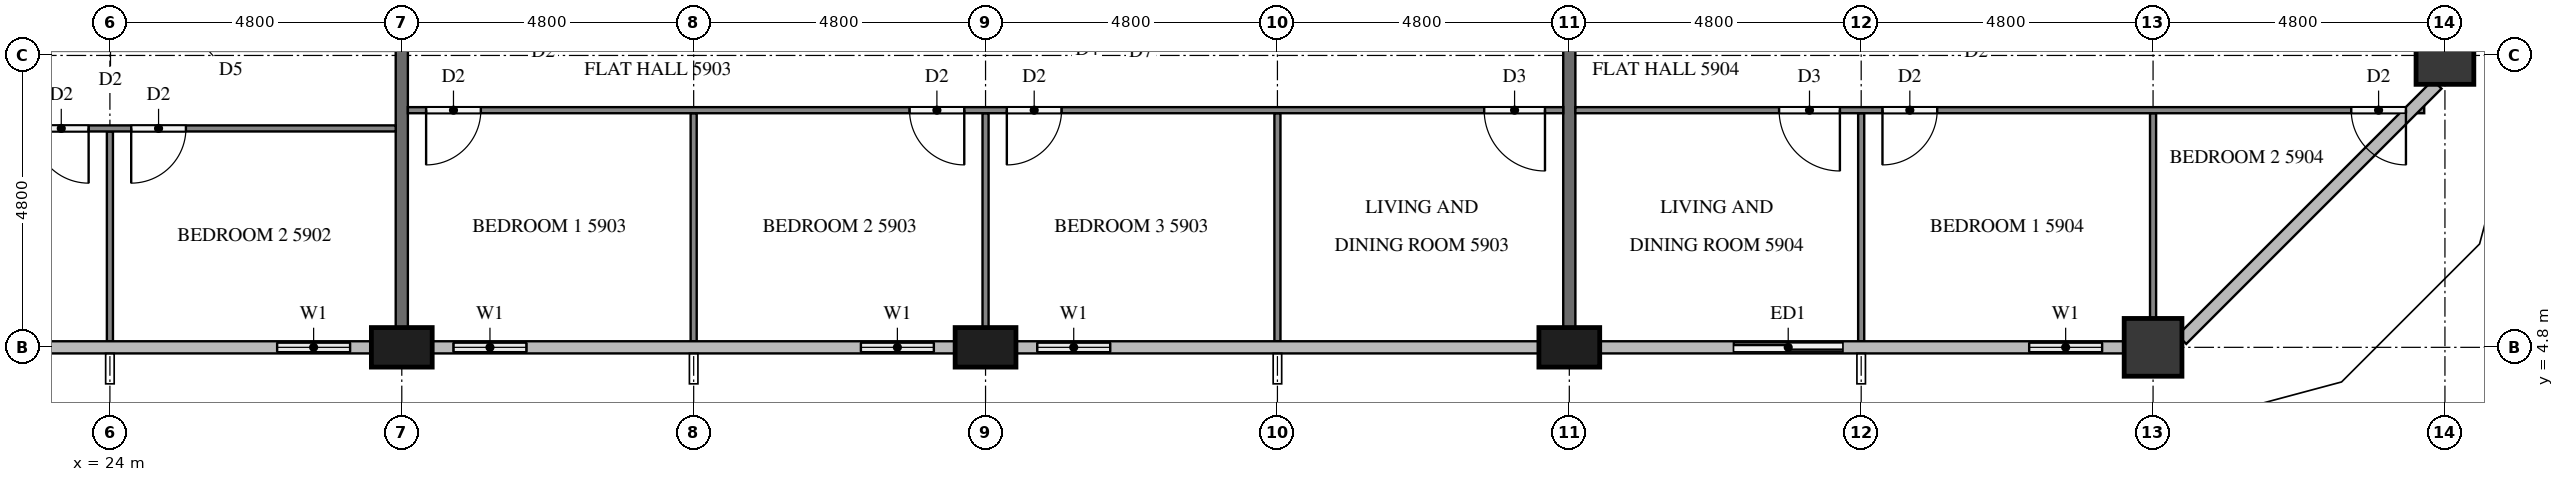
"""IFC4 building model, lengths in metres.
Left out: names, types, materials, properties, quantities, classifications, styles, units other than length and angle.
Written with IfcOpenShell. Run it as: python <this file> out.ifc"""

import sys

from ifc_helpers import new_model, si_unit, direction, frame, frame_2d, origin, origin_2d, place, context, subcontext, project, spatial, rectangle, extrude, element, fill, save


model = new_model("IFC4")
c1 = context("Model", 3, precision=1e-05, world=origin(), true_north=direction((0.0, 1.0)))
c2 = subcontext(c1, "Body", "Model", "MODEL_VIEW")
j1 = project(units=[si_unit("LENGTHUNIT", "METRE"), si_unit("PLANEANGLEUNIT", "RADIAN")], contexts=[c1])
p1 = place(None, origin())
s1 = spatial("IfcSite", under=j1, at=p1, CompositionType="ELEMENT")
p2 = place(p1, origin())
s2 = spatial("IfcBuilding", under=s1, at=p2, CompositionType="ELEMENT")
p3 = place(p2, frame((0.0, 0.0, 226.3)))
s3 = spatial("IfcBuildingStorey", under=s2, at=p3, CompositionType="ELEMENT", Elevation=226.3)
for number, where, z_axis, x_axis in (
    (1, (28.8, 4.8, 0.0), (0.0, 0.0, 1.0), (1.0, 0.0, 0.0)),
    (2, (38.4, 4.8, 0.0), (0.0, 0.0, 1.0), (1.0, 0.0, 0.0)),
    (3, (48.0, 4.8, 0.0), (0.0, 0.0, 1.0), (1.0, 0.0, 0.0)),
):
    element("IfcColumn", number, at=place(p3, frame(where, z_axis=z_axis, x_axis=x_axis)), inside=s3, PredefinedType="COLUMN", context=c2, shape_type="SweptSolid", body=[
        extrude(rectangle(XDim=1.0, YDim=0.65, at=origin_2d()), origin(), (0.0, 0.0, 1.0), 3.2),
    ])
for number, where, z_axis, x_axis in (
    (4, (57.6, 4.8, 0.0), (0.0, 0.0, 1.0), (1.0, 0.0, 0.0)),
    (5, (62.4, 9.6, 0.0), (0.0, 0.0, 1.0), (1.0, 0.0, 0.0)),
):
    element("IfcColumn", number, at=place(p3, frame(where, z_axis=z_axis, x_axis=x_axis)), inside=s3, PredefinedType="COLUMN", context=c2, shape_type="SweptSolid", body=[
        extrude(rectangle(XDim=0.95, YDim=0.95, at=origin_2d()), origin(), (0.0, 0.0, 1.0), 3.2),
    ])
p4 = place(p3, frame((26.4, 4.8, 0.0), z_axis=(0.0, 0.0, 1.0), x_axis=(1.0, 0.0, 0.0)))
e6 = element("IfcWall", 6, at=p4, inside=s3, PredefinedType="SOLIDWALL", context=c2, shape_type="SweptSolid", body=[
    extrude(rectangle(XDim=1.9, YDim=0.15, at=frame_2d((0.95, 0.0))), origin(), (0.0, 0.0, 1.0), 3.2),
])
p5 = place(p4, frame((0.35, 0.0, 0.9)))
e7 = element("IfcOpeningElement", 7, at=p5, cuts=e6, PredefinedType="OPENING", context=c2, shape_type="SweptSolid", body=[
    extrude(rectangle(XDim=1.2, YDim=1.4, at=frame_2d((0.6, 0.7))), frame((0.0, 0.085, 0.0), z_axis=(0.0, -1.0, 0.0), x_axis=(1.0, 0.0, 0.0)), (0.0, 0.0, 1.0), 0.17),
])
p6 = place(p3, frame((29.3, 4.8, 0.0), z_axis=(0.0, 0.0, 1.0), x_axis=(1.0, 0.0, 0.0)))
e8 = element("IfcWall", 8, at=p6, inside=s3, PredefinedType="SOLIDWALL", context=c2, shape_type="SweptSolid", body=[
    extrude(rectangle(XDim=1.9, YDim=0.15, at=frame_2d((0.95, 0.0))), origin(), (0.0, 0.0, 1.0), 3.2),
])
p7 = place(p6, frame((0.35, 0.0, 0.9)))
e9 = element("IfcOpeningElement", 9, at=p7, cuts=e8, PredefinedType="OPENING", context=c2, shape_type="SweptSolid", body=[
    extrude(rectangle(XDim=1.2, YDim=1.4, at=frame_2d((0.6, 0.7))), frame((0.0, 0.085, 0.0), z_axis=(0.0, -1.0, 0.0), x_axis=(1.0, 0.0, 0.0)), (0.0, 0.0, 1.0), 0.17),
])
p8 = place(p3, frame((36.0, 4.8, 0.0), z_axis=(0.0, 0.0, 1.0), x_axis=(1.0, 0.0, 0.0)))
e10 = element("IfcWall", 10, at=p8, inside=s3, PredefinedType="SOLIDWALL", context=c2, shape_type="SweptSolid", body=[
    extrude(rectangle(XDim=1.9, YDim=0.15, at=frame_2d((0.95, 0.0))), origin(), (0.0, 0.0, 1.0), 3.2),
])
p9 = place(p8, frame((0.35, 0.0, 0.9)))
e11 = element("IfcOpeningElement", 11, at=p9, cuts=e10, PredefinedType="OPENING", context=c2, shape_type="SweptSolid", body=[
    extrude(rectangle(XDim=1.2, YDim=1.4, at=frame_2d((0.6, 0.7))), frame((0.0, 0.085, 0.0), z_axis=(0.0, -1.0, 0.0), x_axis=(1.0, 0.0, 0.0)), (0.0, 0.0, 1.0), 0.17),
])
p10 = place(p3, frame((38.9, 4.8, 0.0), z_axis=(0.0, 0.0, 1.0), x_axis=(1.0, 0.0, 0.0)))
e12 = element("IfcWall", 12, at=p10, inside=s3, PredefinedType="SOLIDWALL", context=c2, shape_type="SweptSolid", body=[
    extrude(rectangle(XDim=1.9, YDim=0.15, at=frame_2d((0.95, 0.0))), origin(), (0.0, 0.0, 1.0), 3.2),
])
p11 = place(p10, frame((0.35, 0.0, 0.9)))
e13 = element("IfcOpeningElement", 13, at=p11, cuts=e12, PredefinedType="OPENING", context=c2, shape_type="SweptSolid", body=[
    extrude(rectangle(XDim=1.2, YDim=1.4, at=frame_2d((0.6, 0.7))), frame((0.0, 0.085, 0.0), z_axis=(0.0, -1.0, 0.0), x_axis=(1.0, 0.0, 0.0)), (0.0, 0.0, 1.0), 0.17),
])
p12 = place(p3, frame((50.4, 4.8, 0.0), z_axis=(0.0, 0.0, 1.0), x_axis=(1.0, 0.0, 0.0)))
e14 = element("IfcWall", 14, at=p12, inside=s3, PredefinedType="SOLIDWALL", context=c2, shape_type="SweptSolid", body=[
    extrude(rectangle(XDim=2.4, YDim=0.15, at=frame_2d((1.2, 0.0))), origin(), (0.0, 0.0, 1.0), 3.2),
])
p13 = place(p12, frame((0.3, 0.0, 0.0)))
e15 = element("IfcOpeningElement", 15, at=p13, cuts=e14, PredefinedType="OPENING", context=c2, shape_type="SweptSolid", body=[
    extrude(rectangle(XDim=1.8, YDim=2.4, at=frame_2d((0.9, 1.2))), frame((0.0, 0.085, 0.0), z_axis=(0.0, -1.0, 0.0), x_axis=(1.0, 0.0, 0.0)), (0.0, 0.0, 1.0), 0.17),
])
p14 = place(p3, frame((55.2, 4.8, 0.0), z_axis=(0.0, 0.0, 1.0), x_axis=(1.0, 0.0, 0.0)))
e16 = element("IfcWall", 16, at=p14, inside=s3, PredefinedType="SOLIDWALL", context=c2, shape_type="SweptSolid", body=[
    extrude(rectangle(XDim=1.925, YDim=0.15, at=frame_2d((0.962, 0.0))), origin(), (0.0, 0.0, 1.0), 3.2),
])
p15 = place(p14, frame((0.363, 0.0, 0.9)))
e17 = element("IfcOpeningElement", 17, at=p15, cuts=e16, PredefinedType="OPENING", context=c2, shape_type="SweptSolid", body=[
    extrude(rectangle(XDim=1.2, YDim=1.4, at=frame_2d((0.6, 0.7))), frame((0.0, 0.085, 0.0), z_axis=(0.0, -1.0, 0.0), x_axis=(1.0, 0.0, 0.0)), (0.0, 0.0, 1.0), 0.17),
])
for number, where, z_axis, x_axis in (
    (18, (28.8, 11.9, 0.0), (0.0, 0.0, 1.0), (0.0, -1.0, 0.0)),
    (19, (48.0, 11.9, 0.0), (0.0, 0.0, 1.0), (0.0, -1.0, 0.0)),
):
    element("IfcWall", number, at=place(p3, frame(where, z_axis=z_axis, x_axis=x_axis)), inside=s3, PredefinedType="PARTITIONING", context=c2, shape_type="SweptSolid", body=[
        extrude(rectangle(XDim=6.775, YDim=0.2, at=frame_2d((3.387, 0.0))), origin(), (0.0, 0.0, 1.0), 3.2),
    ])
p16 = place(p3, frame((24.0, 8.35, 0.0), z_axis=(0.0, 0.0, 1.0), x_axis=(0.0, -1.0, 0.0)))
e20 = element("IfcWall", 20, at=p16, inside=s3, PredefinedType="PARTITIONING", context=c2, shape_type="SweptSolid", body=[
    extrude(rectangle(XDim=3.45, YDim=0.1, at=frame_2d((1.725, 0.0))), origin(), (0.0, 0.0, 1.0), 3.2),
])
p17 = place(p3, frame((28.7, 8.4, 0.0), z_axis=(0.0, 0.0, 1.0), x_axis=(-1.0, 0.0, 0.0)))
e21 = element("IfcWall", 21, at=p17, inside=s3, PredefinedType="PARTITIONING", context=c2, shape_type="SweptSolid", body=[
    extrude(rectangle(XDim=14.2, YDim=0.1, at=frame_2d((7.1, 0.0))), origin(), (0.0, 0.0, 1.0), 3.2),
])
p18 = place(p17, frame((12.9, 0.0, 0.0)))
e22 = element("IfcOpeningElement", 22, at=p18, cuts=e21, PredefinedType="OPENING", context=c2, shape_type="SweptSolid", body=[
    extrude(rectangle(XDim=1.0, YDim=2.1, at=frame_2d((0.5, 1.05))), frame((0.0, 0.06, 0.0), z_axis=(0.0, -1.0, 0.0), x_axis=(1.0, 0.0, 0.0)), (0.0, 0.0, 1.0), 0.12),
])
p19 = place(p17, frame((5.05, 0.0, 0.0)))
e23 = element("IfcOpeningElement", 23, at=p19, cuts=e21, PredefinedType="OPENING", context=c2, shape_type="SweptSolid", body=[
    extrude(rectangle(XDim=0.9, YDim=2.1, at=frame_2d((0.45, 1.05))), frame((0.0, 0.06, 0.0), z_axis=(0.0, -1.0, 0.0), x_axis=(1.0, 0.0, 0.0)), (0.0, 0.0, 1.0), 0.12),
])
p20 = place(p17, frame((3.45, 0.0, 0.0)))
e24 = element("IfcOpeningElement", 24, at=p20, cuts=e21, PredefinedType="OPENING", context=c2, shape_type="SweptSolid", body=[
    extrude(rectangle(XDim=0.9, YDim=2.1, at=frame_2d((0.45, 1.05))), frame((0.0, 0.06, 0.0), z_axis=(0.0, -1.0, 0.0), x_axis=(1.0, 0.0, 0.0)), (0.0, 0.0, 1.0), 0.12),
])
p21 = place(p3, frame((33.6, 8.65, 0.0), z_axis=(0.0, 0.0, 1.0), x_axis=(0.0, -1.0, 0.0)))
e25 = element("IfcWall", 25, at=p21, inside=s3, PredefinedType="PARTITIONING", context=c2, shape_type="SweptSolid", body=[
    extrude(rectangle(XDim=3.75, YDim=0.1, at=frame_2d((1.875, 0.0))), origin(), (0.0, 0.0, 1.0), 3.2),
])
p22 = place(p3, frame((38.4, 8.65, 0.0), z_axis=(0.0, 0.0, 1.0), x_axis=(0.0, -1.0, 0.0)))
e26 = element("IfcWall", 26, at=p22, inside=s3, PredefinedType="PARTITIONING", context=c2, shape_type="SweptSolid", body=[
    extrude(rectangle(XDim=3.525, YDim=0.1, at=frame_2d((1.762, 0.0))), origin(), (0.0, 0.0, 1.0), 3.2),
])
p23 = place(p3, frame((43.2, 8.65, 0.0), z_axis=(0.0, 0.0, 1.0), x_axis=(0.0, -1.0, 0.0)))
e27 = element("IfcWall", 27, at=p23, inside=s3, PredefinedType="PARTITIONING", context=c2, shape_type="SweptSolid", body=[
    extrude(rectangle(XDim=3.75, YDim=0.1, at=frame_2d((1.875, 0.0))), origin(), (0.0, 0.0, 1.0), 3.2),
])
p24 = place(p3, frame((47.9, 8.7, 0.0), z_axis=(0.0, 0.0, 1.0), x_axis=(-1.0, 0.0, 0.0)))
e28 = element("IfcWall", 28, at=p24, inside=s3, PredefinedType="PARTITIONING", context=c2, shape_type="SweptSolid", body=[
    extrude(rectangle(XDim=19.0, YDim=0.1, at=frame_2d((9.5, 0.0))), origin(), (0.0, 0.0, 1.0), 3.2),
])
p25 = place(p24, frame((17.8, 0.0, 0.0)))
e29 = element("IfcOpeningElement", 29, at=p25, cuts=e28, PredefinedType="OPENING", context=c2, shape_type="SweptSolid", body=[
    extrude(rectangle(XDim=0.9, YDim=2.1, at=frame_2d((0.45, 1.05))), frame((0.0, 0.06, 0.0), z_axis=(0.0, -1.0, 0.0), x_axis=(1.0, 0.0, 0.0)), (0.0, 0.0, 1.0), 0.12),
])
p26 = place(p24, frame((9.85, 0.0, 0.0)))
e30 = element("IfcOpeningElement", 30, at=p26, cuts=e28, PredefinedType="OPENING", context=c2, shape_type="SweptSolid", body=[
    extrude(rectangle(XDim=0.9, YDim=2.1, at=frame_2d((0.45, 1.05))), frame((0.0, 0.06, 0.0), z_axis=(0.0, -1.0, 0.0), x_axis=(1.0, 0.0, 0.0)), (0.0, 0.0, 1.0), 0.12),
])
p27 = place(p24, frame((8.25, 0.0, 0.0)))
e31 = element("IfcOpeningElement", 31, at=p27, cuts=e28, PredefinedType="OPENING", context=c2, shape_type="SweptSolid", body=[
    extrude(rectangle(XDim=0.9, YDim=2.1, at=frame_2d((0.45, 1.05))), frame((0.0, 0.06, 0.0), z_axis=(0.0, -1.0, 0.0), x_axis=(1.0, 0.0, 0.0)), (0.0, 0.0, 1.0), 0.12),
])
p28 = place(p24, frame((0.3, 0.0, 0.0)))
e32 = element("IfcOpeningElement", 32, at=p28, cuts=e28, PredefinedType="OPENING", context=c2, shape_type="SweptSolid", body=[
    extrude(rectangle(XDim=1.0, YDim=2.1, at=frame_2d((0.5, 1.05))), frame((0.0, 0.06, 0.0), z_axis=(0.0, -1.0, 0.0), x_axis=(1.0, 0.0, 0.0)), (0.0, 0.0, 1.0), 0.12),
])
p29 = place(p3, frame((52.8, 8.65, 0.0), z_axis=(0.0, 0.0, 1.0), x_axis=(0.0, -1.0, 0.0)))
e33 = element("IfcWall", 33, at=p29, inside=s3, PredefinedType="PARTITIONING", context=c2, shape_type="SweptSolid", body=[
    extrude(rectangle(XDim=3.75, YDim=0.1, at=frame_2d((1.875, 0.0))), origin(), (0.0, 0.0, 1.0), 3.2),
])
p30 = place(p3, frame((57.6, 8.65, 0.0), z_axis=(0.0, 0.0, 1.0), x_axis=(0.0, -1.0, 0.0)))
e34 = element("IfcWall", 34, at=p30, inside=s3, PredefinedType="PARTITIONING", context=c2, shape_type="SweptSolid", body=[
    extrude(rectangle(XDim=3.375, YDim=0.1, at=frame_2d((1.688, 0.0))), origin(), (0.0, 0.0, 1.0), 3.2),
])
p31 = place(p3, frame((62.059, 8.7, 0.0), z_axis=(0.0, 0.0, 1.0), x_axis=(-1.0, 0.0, 0.0)))
e35 = element("IfcWall", 35, at=p31, inside=s3, PredefinedType="PARTITIONING", context=c2, shape_type="SweptSolid", body=[
    extrude(rectangle(XDim=13.959, YDim=0.1, at=frame_2d((6.979, 0.0))), origin(), (0.0, 0.0, 1.0), 3.2),
])
p32 = place(p31, frame((9.609, 0.0, 0.0)))
e36 = element("IfcOpeningElement", 36, at=p32, cuts=e35, PredefinedType="OPENING", context=c2, shape_type="SweptSolid", body=[
    extrude(rectangle(XDim=1.0, YDim=2.1, at=frame_2d((0.5, 1.05))), frame((0.0, 0.06, 0.0), z_axis=(0.0, -1.0, 0.0), x_axis=(1.0, 0.0, 0.0)), (0.0, 0.0, 1.0), 0.12),
])
p33 = place(p31, frame((8.009, 0.0, 0.0)))
e37 = element("IfcOpeningElement", 37, at=p33, cuts=e35, PredefinedType="OPENING", context=c2, shape_type="SweptSolid", body=[
    extrude(rectangle(XDim=0.9, YDim=2.1, at=frame_2d((0.45, 1.05))), frame((0.0, 0.06, 0.0), z_axis=(0.0, -1.0, 0.0), x_axis=(1.0, 0.0, 0.0)), (0.0, 0.0, 1.0), 0.12),
])
p34 = place(p31, frame((0.3, 0.0, 0.0)))
e38 = element("IfcOpeningElement", 38, at=p34, cuts=e35, PredefinedType="OPENING", context=c2, shape_type="SweptSolid", body=[
    extrude(rectangle(XDim=0.9, YDim=2.1, at=frame_2d((0.45, 1.05))), frame((0.0, 0.06, 0.0), z_axis=(0.0, -1.0, 0.0), x_axis=(1.0, 0.0, 0.0)), (0.0, 0.0, 1.0), 0.12),
])
p35 = place(p5, origin())
e39 = element("IfcWindow", 39, at=p35, inside=s3, PartitioningType="SINGLE_PANEL", PredefinedType="WINDOW", context=c2, shape_type="SweptSolid", body=[
    extrude(rectangle(XDim=1.2, YDim=1.4, at=frame_2d((0.6, 0.7))), frame((0.0, 0.03, 0.0), z_axis=(0.0, -1.0, 0.0), x_axis=(1.0, 0.0, 0.0)), (0.0, 0.0, 1.0), 0.06),
])
fill(e7, e39)
p36 = place(p7, origin())
e40 = element("IfcWindow", 40, at=p36, inside=s3, PartitioningType="SINGLE_PANEL", PredefinedType="WINDOW", context=c2, shape_type="SweptSolid", body=[
    extrude(rectangle(XDim=1.2, YDim=1.4, at=frame_2d((0.6, 0.7))), frame((0.0, 0.03, 0.0), z_axis=(0.0, -1.0, 0.0), x_axis=(1.0, 0.0, 0.0)), (0.0, 0.0, 1.0), 0.06),
])
fill(e9, e40)
p37 = place(p9, origin())
e41 = element("IfcWindow", 41, at=p37, inside=s3, PartitioningType="SINGLE_PANEL", PredefinedType="WINDOW", context=c2, shape_type="SweptSolid", body=[
    extrude(rectangle(XDim=1.2, YDim=1.4, at=frame_2d((0.6, 0.7))), frame((0.0, 0.03, 0.0), z_axis=(0.0, -1.0, 0.0), x_axis=(1.0, 0.0, 0.0)), (0.0, 0.0, 1.0), 0.06),
])
fill(e11, e41)
p38 = place(p11, origin())
e42 = element("IfcWindow", 42, at=p38, inside=s3, PartitioningType="SINGLE_PANEL", PredefinedType="WINDOW", context=c2, shape_type="SweptSolid", body=[
    extrude(rectangle(XDim=1.2, YDim=1.4, at=frame_2d((0.6, 0.7))), frame((0.0, 0.03, 0.0), z_axis=(0.0, -1.0, 0.0), x_axis=(1.0, 0.0, 0.0)), (0.0, 0.0, 1.0), 0.06),
])
fill(e13, e42)
p39 = place(p13, origin())
e43 = element("IfcDoor", 43, at=p39, inside=s3, OperationType="SLIDING_TO_RIGHT", PredefinedType="DOOR", context=c2, shape_type="SweptSolid", body=[
    extrude(rectangle(XDim=1.8, YDim=2.4, at=frame_2d((0.9, 1.2))), frame((0.0, 0.025, 0.0), z_axis=(0.0, -1.0, 0.0), x_axis=(1.0, 0.0, 0.0)), (0.0, 0.0, 1.0), 0.05),
])
fill(e15, e43)
p40 = place(p15, origin())
e44 = element("IfcWindow", 44, at=p40, inside=s3, PartitioningType="SINGLE_PANEL", PredefinedType="WINDOW", context=c2, shape_type="SweptSolid", body=[
    extrude(rectangle(XDim=1.2, YDim=1.4, at=frame_2d((0.6, 0.7))), frame((0.0, 0.03, 0.0), z_axis=(0.0, -1.0, 0.0), x_axis=(1.0, 0.0, 0.0)), (0.0, 0.0, 1.0), 0.06),
])
fill(e17, e44)
p41 = place(p19, origin())
e45 = element("IfcDoor", 45, at=p41, inside=s3, OperationType="SINGLE_SWING_LEFT", PredefinedType="DOOR", context=c2, shape_type="SweptSolid", body=[
    extrude(rectangle(XDim=0.9, YDim=2.1, at=frame_2d((0.45, 1.05))), frame((0.0, 0.025, 0.0), z_axis=(0.0, -1.0, 0.0), x_axis=(1.0, 0.0, 0.0)), (0.0, 0.0, 1.0), 0.05),
])
fill(e23, e45)
p42 = place(p20, origin())
e46 = element("IfcDoor", 46, at=p42, inside=s3, OperationType="SINGLE_SWING_RIGHT", PredefinedType="DOOR", context=c2, shape_type="SweptSolid", body=[
    extrude(rectangle(XDim=0.9, YDim=2.1, at=frame_2d((0.45, 1.05))), frame((0.0, 0.025, 0.0), z_axis=(0.0, -1.0, 0.0), x_axis=(1.0, 0.0, 0.0)), (0.0, 0.0, 1.0), 0.05),
])
fill(e24, e46)
p43 = place(p25, origin())
e47 = element("IfcDoor", 47, at=p43, inside=s3, OperationType="SINGLE_SWING_RIGHT", PredefinedType="DOOR", context=c2, shape_type="SweptSolid", body=[
    extrude(rectangle(XDim=0.9, YDim=2.1, at=frame_2d((0.45, 1.05))), frame((0.0, 0.025, 0.0), z_axis=(0.0, -1.0, 0.0), x_axis=(1.0, 0.0, 0.0)), (0.0, 0.0, 1.0), 0.05),
])
fill(e29, e47)
p44 = place(p26, origin())
e48 = element("IfcDoor", 48, at=p44, inside=s3, OperationType="SINGLE_SWING_LEFT", PredefinedType="DOOR", context=c2, shape_type="SweptSolid", body=[
    extrude(rectangle(XDim=0.9, YDim=2.1, at=frame_2d((0.45, 1.05))), frame((0.0, 0.025, 0.0), z_axis=(0.0, -1.0, 0.0), x_axis=(1.0, 0.0, 0.0)), (0.0, 0.0, 1.0), 0.05),
])
fill(e30, e48)
p45 = place(p27, origin())
e49 = element("IfcDoor", 49, at=p45, inside=s3, OperationType="SINGLE_SWING_RIGHT", PredefinedType="DOOR", context=c2, shape_type="SweptSolid", body=[
    extrude(rectangle(XDim=0.9, YDim=2.1, at=frame_2d((0.45, 1.05))), frame((0.0, 0.025, 0.0), z_axis=(0.0, -1.0, 0.0), x_axis=(1.0, 0.0, 0.0)), (0.0, 0.0, 1.0), 0.05),
])
fill(e31, e49)
p46 = place(p28, origin())
e50 = element("IfcDoor", 50, at=p46, inside=s3, OperationType="SINGLE_SWING_LEFT", PredefinedType="DOOR", context=c2, shape_type="SweptSolid", body=[
    extrude(rectangle(XDim=1.0, YDim=2.1, at=frame_2d((0.5, 1.05))), frame((0.0, 0.025, 0.0), z_axis=(0.0, -1.0, 0.0), x_axis=(1.0, 0.0, 0.0)), (0.0, 0.0, 1.0), 0.05),
])
fill(e32, e50)
p47 = place(p32, origin())
e51 = element("IfcDoor", 51, at=p47, inside=s3, OperationType="SINGLE_SWING_LEFT", PredefinedType="DOOR", context=c2, shape_type="SweptSolid", body=[
    extrude(rectangle(XDim=1.0, YDim=2.1, at=frame_2d((0.5, 1.05))), frame((0.0, 0.025, 0.0), z_axis=(0.0, -1.0, 0.0), x_axis=(1.0, 0.0, 0.0)), (0.0, 0.0, 1.0), 0.05),
])
fill(e36, e51)
p48 = place(p33, origin())
e52 = element("IfcDoor", 52, at=p48, inside=s3, OperationType="SINGLE_SWING_RIGHT", PredefinedType="DOOR", context=c2, shape_type="SweptSolid", body=[
    extrude(rectangle(XDim=0.9, YDim=2.1, at=frame_2d((0.45, 1.05))), frame((0.0, 0.025, 0.0), z_axis=(0.0, -1.0, 0.0), x_axis=(1.0, 0.0, 0.0)), (0.0, 0.0, 1.0), 0.05),
])
fill(e37, e52)
p49 = place(p34, origin())
e53 = element("IfcDoor", 53, at=p49, inside=s3, OperationType="SINGLE_SWING_LEFT", PredefinedType="DOOR", context=c2, shape_type="SweptSolid", body=[
    extrude(rectangle(XDim=0.9, YDim=2.1, at=frame_2d((0.45, 1.05))), frame((0.0, 0.025, 0.0), z_axis=(0.0, -1.0, 0.0), x_axis=(1.0, 0.0, 0.0)), (0.0, 0.0, 1.0), 0.05),
])
fill(e38, e53)
save(model, sys.argv[1])
